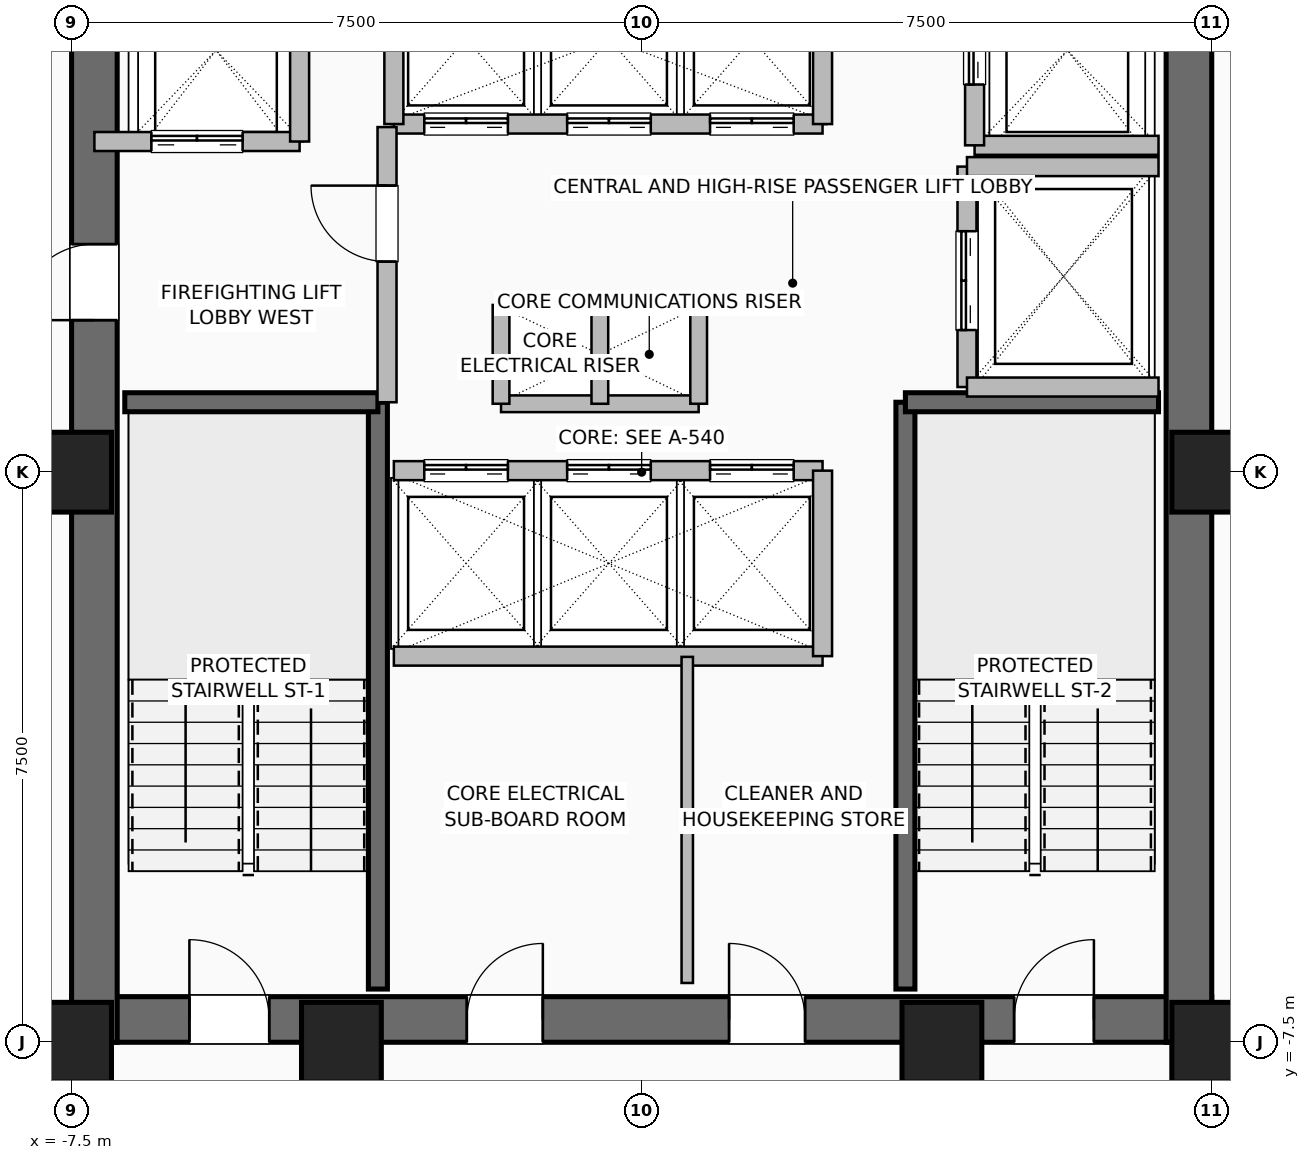
"""IFC4 building model, lengths in metres.
Left out: names, types, materials, properties, quantities, classifications, styles, units other than length and angle.
Written with IfcOpenShell. Run it as: python <this file> out.ifc"""

import sys

from ifc_helpers import new_model, si_unit, direction, frame, frame_2d, origin, origin_2d, place, context, subcontext, project, spatial, rectangle, hollow_rectangle, extrude, element, fill, save


model = new_model("IFC4")
c1 = context("Model", 3, precision=1e-05, world=origin(), true_north=direction((0.0, 1.0)))
c2 = subcontext(c1, "Body", "Model", "MODEL_VIEW")
j1 = project(units=[si_unit("LENGTHUNIT", "METRE"), si_unit("PLANEANGLEUNIT", "RADIAN")], contexts=[c1])
p1 = place(None, origin())
s1 = spatial("IfcSite", under=j1, at=p1, CompositionType="ELEMENT")
p2 = place(p1, origin())
s2 = spatial("IfcBuilding", under=s1, at=p2, CompositionType="ELEMENT")
p3 = place(p2, frame((0.0, 0.0, 151.6)))
s3 = spatial("IfcBuildingStorey", under=s2, at=p3, CompositionType="ELEMENT", Elevation=151.6)
for number, where, z_axis, x_axis in (
    (1, (-7.5, -7.5, 0.0), (0.0, 0.0, 1.0), (1.0, 0.0, 0.0)),
    (2, (-3.95, -7.5, 0.0), (0.0, 0.0, 1.0), (1.0, 0.0, 0.0)),
    (3, (3.95, -7.5, 0.0), (0.0, 0.0, 1.0), (1.0, 0.0, 0.0)),
    (4, (7.5, -7.5, 0.0), (0.0, 0.0, 1.0), (1.0, 0.0, 0.0)),
    (5, (7.5, 0.0, 0.0), (0.0, 0.0, 1.0), (1.0, 0.0, 0.0)),
    (6, (-7.5, 0.0, 0.0), (0.0, 0.0, 1.0), (1.0, 0.0, 0.0)),
):
    element("IfcColumn", number, at=place(p3, frame(where, z_axis=z_axis, x_axis=x_axis)), inside=s3, PredefinedType="COLUMN", context=c2, shape_type="SweptSolid", body=[
        extrude(hollow_rectangle(XDim=1.05, YDim=1.05, WallThickness=0.05, at=origin_2d()), origin(), (0.0, 0.0, 1.0), 3.6),
    ])
p4 = place(p3, frame((-7.5, -7.2, 0.0), z_axis=(0.0, 0.0, 1.0), x_axis=(1.0, 0.0, 0.0)))
e7 = element("IfcWall", 7, at=p4, inside=s3, PredefinedType="SHEAR", context=c2, shape_type="SweptSolid", body=[
    extrude(rectangle(XDim=15.0, YDim=0.6, at=frame_2d((7.5, 0.0))), origin(), (0.0, 0.0, 1.0), 3.25),
])
p5 = place(p4, frame((1.55, 0.0, 0.0)))
e8 = element("IfcOpeningElement", 8, at=p5, cuts=e7, PredefinedType="OPENING", context=c2, shape_type="SweptSolid", body=[
    extrude(rectangle(XDim=1.05, YDim=2.08, at=frame_2d((0.525, 1.04))), frame((0.0, 0.31, 0.0), z_axis=(0.0, -1.0, 0.0), x_axis=(1.0, 0.0, 0.0)), (0.0, 0.0, 1.0), 0.62),
])
p6 = place(p4, frame((12.4, 0.0, 0.0)))
e9 = element("IfcOpeningElement", 9, at=p6, cuts=e7, PredefinedType="OPENING", context=c2, shape_type="SweptSolid", body=[
    extrude(rectangle(XDim=1.05, YDim=2.08, at=frame_2d((0.525, 1.04))), frame((0.0, 0.31, 0.0), z_axis=(0.0, -1.0, 0.0), x_axis=(1.0, 0.0, 0.0)), (0.0, 0.0, 1.0), 0.62),
])
p7 = place(p4, frame((5.2, 0.0, 0.0)))
e10 = element("IfcOpeningElement", 10, at=p7, cuts=e7, PredefinedType="OPENING", context=c2, shape_type="SweptSolid", body=[
    extrude(rectangle(XDim=1.0, YDim=2.08, at=frame_2d((0.5, 1.04))), frame((0.0, 0.31, 0.0), z_axis=(0.0, -1.0, 0.0), x_axis=(1.0, 0.0, 0.0)), (0.0, 0.0, 1.0), 0.62),
])
p8 = place(p4, frame((8.65, 0.0, 0.0)))
e11 = element("IfcOpeningElement", 11, at=p8, cuts=e7, PredefinedType="OPENING", context=c2, shape_type="SweptSolid", body=[
    extrude(rectangle(XDim=1.0, YDim=2.08, at=frame_2d((0.5, 1.04))), frame((0.0, 0.31, 0.0), z_axis=(0.0, -1.0, 0.0), x_axis=(1.0, 0.0, 0.0)), (0.0, 0.0, 1.0), 0.62),
])
p9 = place(p3, frame((-7.2, -7.5, 0.0), z_axis=(0.0, 0.0, 1.0), x_axis=(0.0, 1.0, 0.0)))
e12 = element("IfcWall", 12, at=p9, inside=s3, PredefinedType="SHEAR", context=c2, shape_type="SweptSolid", body=[
    extrude(rectangle(XDim=15.0, YDim=0.6, at=frame_2d((7.5, 0.0))), origin(), (0.0, 0.0, 1.0), 3.25),
])
p10 = place(p9, frame((9.5, 0.0, 0.0)))
e13 = element("IfcOpeningElement", 13, at=p10, cuts=e12, PredefinedType="OPENING", context=c2, shape_type="SweptSolid", body=[
    extrude(rectangle(XDim=1.0, YDim=2.08, at=frame_2d((0.5, 1.04))), frame((0.0, 0.31, 0.0), z_axis=(0.0, -1.0, 0.0), x_axis=(1.0, 0.0, 0.0)), (0.0, 0.0, 1.0), 0.62),
])
p11 = place(p3, frame((7.2, -7.5, 0.0), z_axis=(0.0, 0.0, 1.0), x_axis=(0.0, 1.0, 0.0)))
e14 = element("IfcWall", 14, at=p11, inside=s3, PredefinedType="SHEAR", context=c2, shape_type="SweptSolid", body=[
    extrude(rectangle(XDim=15.0, YDim=0.6, at=frame_2d((7.5, 0.0))), origin(), (0.0, 0.0, 1.0), 3.25),
])
p12 = place(p3, frame((-3.47, -6.8, 0.0), z_axis=(0.0, 0.0, 1.0), x_axis=(0.0, 1.0, 0.0)))
e15 = element("IfcWall", 15, at=p12, inside=s3, PredefinedType="SHEAR", context=c2, shape_type="SweptSolid", body=[
    extrude(rectangle(XDim=7.72, YDim=0.25, at=frame_2d((3.86, 0.0))), origin(), (0.0, 0.0, 1.0), 3.25),
])
p13 = place(p3, frame((-6.8, 0.92, 0.0), z_axis=(0.0, 0.0, 1.0), x_axis=(1.0, 0.0, 0.0)))
e16 = element("IfcWall", 16, at=p13, inside=s3, PredefinedType="SHEAR", context=c2, shape_type="SweptSolid", body=[
    extrude(rectangle(XDim=3.33, YDim=0.25, at=frame_2d((1.665, 0.0))), origin(), (0.0, 0.0, 1.0), 3.25),
])
p14 = place(p3, frame((3.47, -6.8, 0.0), z_axis=(0.0, 0.0, 1.0), x_axis=(0.0, 1.0, 0.0)))
e17 = element("IfcWall", 17, at=p14, inside=s3, PredefinedType="SHEAR", context=c2, shape_type="SweptSolid", body=[
    extrude(rectangle(XDim=7.72, YDim=0.25, at=frame_2d((3.86, 0.0))), origin(), (0.0, 0.0, 1.0), 3.25),
])
p15 = place(p3, frame((3.47, 0.92, 0.0), z_axis=(0.0, 0.0, 1.0), x_axis=(1.0, 0.0, 0.0)))
e18 = element("IfcWall", 18, at=p15, inside=s3, PredefinedType="SHEAR", context=c2, shape_type="SweptSolid", body=[
    extrude(rectangle(XDim=3.33, YDim=0.25, at=frame_2d((1.665, 0.0))), origin(), (0.0, 0.0, 1.0), 3.25),
])
for number, where, z_axis, x_axis in (
    (19, (-1.85, 2.2, 0.0), (0.0, 0.0, 1.0), (1.0, 0.0, 0.0)),
    (20, (-1.85, 0.9, 0.0), (0.0, 0.0, 1.0), (1.0, 0.0, 0.0)),
):
    element("IfcWall", number, at=place(p3, frame(where, z_axis=z_axis, x_axis=x_axis)), inside=s3, PredefinedType="PARTITIONING", context=c2, shape_type="SweptSolid", body=[
        extrude(rectangle(XDim=2.6, YDim=0.22, at=frame_2d((1.3, 0.0))), origin(), (0.0, 0.0, 1.0), 3.25),
    ])
for number, where, z_axis, x_axis in (
    (21, (-0.55, 0.9, 0.0), (0.0, 0.0, 1.0), (0.0, 1.0, 0.0)),
    (22, (0.75, 0.9, 0.0), (0.0, 0.0, 1.0), (0.0, 1.0, 0.0)),
    (23, (-1.85, 0.9, 0.0), (0.0, 0.0, 1.0), (0.0, 1.0, 0.0)),
):
    element("IfcWall", number, at=place(p3, frame(where, z_axis=z_axis, x_axis=x_axis)), inside=s3, PredefinedType="PARTITIONING", context=c2, shape_type="SweptSolid", body=[
        extrude(rectangle(XDim=1.3, YDim=0.22, at=frame_2d((0.65, 0.0))), origin(), (0.0, 0.0, 1.0), 3.25),
    ])
p16 = place(p3, frame((-3.26, 0.02, 0.0), z_axis=(0.0, 0.0, 1.0), x_axis=(1.0, 0.0, 0.0)))
e24 = element("IfcWall", 24, at=p16, inside=s3, PredefinedType="SHEAR", context=c2, shape_type="SweptSolid", body=[
    extrude(rectangle(XDim=5.64, YDim=0.25, at=frame_2d((2.82, 0.0))), origin(), (0.0, 0.0, 1.0), 3.25),
])
p17 = place(p16, frame((0.4, 0.0, 0.0)))
e25 = element("IfcOpeningElement", 25, at=p17, cuts=e24, PredefinedType="OPENING", context=c2, shape_type="SweptSolid", body=[
    extrude(rectangle(XDim=1.1, YDim=2.2, at=frame_2d((0.55, 1.1))), frame((0.0, 0.135, 0.0), z_axis=(0.0, -1.0, 0.0), x_axis=(1.0, 0.0, 0.0)), (0.0, 0.0, 1.0), 0.27),
])
p18 = place(p16, frame((2.28, 0.0, 0.0)))
e26 = element("IfcOpeningElement", 26, at=p18, cuts=e24, PredefinedType="OPENING", context=c2, shape_type="SweptSolid", body=[
    extrude(rectangle(XDim=1.1, YDim=2.2, at=frame_2d((0.55, 1.1))), frame((0.0, 0.135, 0.0), z_axis=(0.0, -1.0, 0.0), x_axis=(1.0, 0.0, 0.0)), (0.0, 0.0, 1.0), 0.27),
])
p19 = place(p16, frame((4.16, 0.0, 0.0)))
e27 = element("IfcOpeningElement", 27, at=p19, cuts=e24, PredefinedType="OPENING", context=c2, shape_type="SweptSolid", body=[
    extrude(rectangle(XDim=1.1, YDim=2.2, at=frame_2d((0.55, 1.1))), frame((0.0, 0.135, 0.0), z_axis=(0.0, -1.0, 0.0), x_axis=(1.0, 0.0, 0.0)), (0.0, 0.0, 1.0), 0.27),
])
p20 = place(p3, frame((-3.26, -2.42, 0.0), z_axis=(0.0, 0.0, 1.0), x_axis=(1.0, 0.0, 0.0)))
e28 = element("IfcWall", 28, at=p20, inside=s3, PredefinedType="SHEAR", context=c2, shape_type="SweptSolid", body=[
    extrude(rectangle(XDim=5.64, YDim=0.25, at=frame_2d((2.82, 0.0))), origin(), (0.0, 0.0, 1.0), 3.25),
])
p21 = place(p3, frame((2.38, -2.42, 0.0), z_axis=(0.0, 0.0, 1.0), x_axis=(0.0, 1.0, 0.0)))
e29 = element("IfcWall", 29, at=p21, inside=s3, PredefinedType="SHEAR", context=c2, shape_type="SweptSolid", body=[
    extrude(rectangle(XDim=2.44, YDim=0.25, at=frame_2d((1.22, 0.0))), origin(), (0.0, 0.0, 1.0), 3.25),
])
p22 = place(p3, frame((-3.26, 4.58, 0.0), z_axis=(0.0, 0.0, 1.0), x_axis=(1.0, 0.0, 0.0)))
e30 = element("IfcWall", 30, at=p22, inside=s3, PredefinedType="SHEAR", context=c2, shape_type="SweptSolid", body=[
    extrude(rectangle(XDim=5.64, YDim=0.25, at=frame_2d((2.82, 0.0))), origin(), (0.0, 0.0, 1.0), 3.25),
])
p23 = place(p22, frame((0.4, 0.0, 0.0)))
e31 = element("IfcOpeningElement", 31, at=p23, cuts=e30, PredefinedType="OPENING", context=c2, shape_type="SweptSolid", body=[
    extrude(rectangle(XDim=1.1, YDim=2.2, at=frame_2d((0.55, 1.1))), frame((0.0, 0.135, 0.0), z_axis=(0.0, -1.0, 0.0), x_axis=(1.0, 0.0, 0.0)), (0.0, 0.0, 1.0), 0.27),
])
p24 = place(p22, frame((2.28, 0.0, 0.0)))
e32 = element("IfcOpeningElement", 32, at=p24, cuts=e30, PredefinedType="OPENING", context=c2, shape_type="SweptSolid", body=[
    extrude(rectangle(XDim=1.1, YDim=2.2, at=frame_2d((0.55, 1.1))), frame((0.0, 0.135, 0.0), z_axis=(0.0, -1.0, 0.0), x_axis=(1.0, 0.0, 0.0)), (0.0, 0.0, 1.0), 0.27),
])
p25 = place(p22, frame((4.16, 0.0, 0.0)))
e33 = element("IfcOpeningElement", 33, at=p25, cuts=e30, PredefinedType="OPENING", context=c2, shape_type="SweptSolid", body=[
    extrude(rectangle(XDim=1.1, YDim=2.2, at=frame_2d((0.55, 1.1))), frame((0.0, 0.135, 0.0), z_axis=(0.0, -1.0, 0.0), x_axis=(1.0, 0.0, 0.0)), (0.0, 0.0, 1.0), 0.27),
])
for number, where, z_axis, x_axis in (
    (34, (-3.26, 4.58, 0.0), (0.0, 0.0, 1.0), (0.0, 1.0, 0.0)),
    (35, (2.38, 4.58, 0.0), (0.0, 0.0, 1.0), (0.0, 1.0, 0.0)),
):
    element("IfcWall", number, at=place(p3, frame(where, z_axis=z_axis, x_axis=x_axis)), inside=s3, PredefinedType="SHEAR", context=c2, shape_type="SweptSolid", body=[
        extrude(rectangle(XDim=2.22, YDim=0.25, at=frame_2d((1.11, 0.0))), origin(), (0.0, 0.0, 1.0), 3.25),
    ])
p26 = place(p3, frame((-7.2, 4.35, 0.0), z_axis=(0.0, 0.0, 1.0), x_axis=(1.0, 0.0, 0.0)))
e36 = element("IfcWall", 36, at=p26, inside=s3, PredefinedType="SHEAR", context=c2, shape_type="SweptSolid", body=[
    extrude(rectangle(XDim=2.7, YDim=0.25, at=frame_2d((1.35, 0.0))), origin(), (0.0, 0.0, 1.0), 3.25),
])
p27 = place(p26, frame((0.75, 0.0, 0.0)))
e37 = element("IfcOpeningElement", 37, at=p27, cuts=e36, PredefinedType="OPENING", context=c2, shape_type="SweptSolid", body=[
    extrude(rectangle(XDim=1.2, YDim=2.2, at=frame_2d((0.6, 1.1))), frame((0.0, 0.135, 0.0), z_axis=(0.0, -1.0, 0.0), x_axis=(1.0, 0.0, 0.0)), (0.0, 0.0, 1.0), 0.27),
])
p28 = place(p3, frame((-4.5, 4.35, 0.0), z_axis=(0.0, 0.0, 1.0), x_axis=(0.0, 1.0, 0.0)))
e38 = element("IfcWall", 38, at=p28, inside=s3, PredefinedType="SHEAR", context=c2, shape_type="SweptSolid", body=[
    extrude(rectangle(XDim=2.85, YDim=0.25, at=frame_2d((1.425, 0.0))), origin(), (0.0, 0.0, 1.0), 3.25),
])
p29 = place(p3, frame((4.38, 4.3, 0.0), z_axis=(0.0, 0.0, 1.0), x_axis=(1.0, 0.0, 0.0)))
e39 = element("IfcWall", 39, at=p29, inside=s3, PredefinedType="SHEAR", context=c2, shape_type="SweptSolid", body=[
    extrude(rectangle(XDim=2.42, YDim=0.25, at=frame_2d((1.21, 0.0))), origin(), (0.0, 0.0, 1.0), 3.25),
])
p30 = place(p3, frame((4.38, 4.3, 0.0), z_axis=(0.0, 0.0, 1.0), x_axis=(0.0, 1.0, 0.0)))
e40 = element("IfcWall", 40, at=p30, inside=s3, PredefinedType="SHEAR", context=c2, shape_type="SweptSolid", body=[
    extrude(rectangle(XDim=2.5, YDim=0.25, at=frame_2d((1.25, 0.0))), origin(), (0.0, 0.0, 1.0), 3.25),
])
p31 = place(p30, frame((0.8, 0.0, 0.0)))
e41 = element("IfcOpeningElement", 41, at=p31, cuts=e40, PredefinedType="OPENING", context=c2, shape_type="SweptSolid", body=[
    extrude(rectangle(XDim=1.2, YDim=2.2, at=frame_2d((0.6, 1.1))), frame((0.0, 0.135, 0.0), z_axis=(0.0, -1.0, 0.0), x_axis=(1.0, 0.0, 0.0)), (0.0, 0.0, 1.0), 0.27),
])
p32 = place(p3, frame((4.28, 1.12, 0.0), z_axis=(0.0, 0.0, 1.0), x_axis=(0.0, 1.0, 0.0)))
e42 = element("IfcWall", 42, at=p32, inside=s3, PredefinedType="SHEAR", context=c2, shape_type="SweptSolid", body=[
    extrude(rectangle(XDim=2.9, YDim=0.25, at=frame_2d((1.45, 0.0))), origin(), (0.0, 0.0, 1.0), 3.25),
])
p33 = place(p32, frame((0.75, 0.0, 0.0)))
e43 = element("IfcOpeningElement", 43, at=p33, cuts=e42, PredefinedType="OPENING", context=c2, shape_type="SweptSolid", body=[
    extrude(rectangle(XDim=1.3, YDim=2.3, at=frame_2d((0.65, 1.15))), frame((0.0, 0.135, 0.0), z_axis=(0.0, -1.0, 0.0), x_axis=(1.0, 0.0, 0.0)), (0.0, 0.0, 1.0), 0.27),
])
for number, where, z_axis, x_axis in (
    (44, (4.28, 1.12, 0.0), (0.0, 0.0, 1.0), (1.0, 0.0, 0.0)),
    (45, (4.28, 4.02, 0.0), (0.0, 0.0, 1.0), (1.0, 0.0, 0.0)),
):
    element("IfcWall", number, at=place(p3, frame(where, z_axis=z_axis, x_axis=x_axis)), inside=s3, PredefinedType="SHEAR", context=c2, shape_type="SweptSolid", body=[
        extrude(rectangle(XDim=2.52, YDim=0.25, at=frame_2d((1.26, 0.0))), origin(), (0.0, 0.0, 1.0), 3.25),
    ])
p34 = place(p3, frame((-3.35, 0.92, 0.0), z_axis=(0.0, 0.0, 1.0), x_axis=(0.0, 1.0, 0.0)))
e46 = element("IfcWall", 46, at=p34, inside=s3, PredefinedType="SHEAR", context=c2, shape_type="SweptSolid", body=[
    extrude(rectangle(XDim=3.62, YDim=0.25, at=frame_2d((1.81, 0.0))), origin(), (0.0, 0.0, 1.0), 3.25),
])
p35 = place(p34, frame((1.85, 0.0, 0.0)))
e47 = element("IfcOpeningElement", 47, at=p35, cuts=e46, PredefinedType="OPENING", context=c2, shape_type="SweptSolid", body=[
    extrude(rectangle(XDim=1.0, YDim=2.08, at=frame_2d((0.5, 1.04))), frame((0.0, 0.135, 0.0), z_axis=(0.0, -1.0, 0.0), x_axis=(1.0, 0.0, 0.0)), (0.0, 0.0, 1.0), 0.27),
])
p36 = place(p3, frame((0.6, -6.72, 0.0), z_axis=(0.0, 0.0, 1.0), x_axis=(0.0, 1.0, 0.0)))
e48 = element("IfcWall", 48, at=p36, inside=s3, PredefinedType="PARTITIONING", context=c2, shape_type="SweptSolid", body=[
    extrude(rectangle(XDim=4.29, YDim=0.15, at=frame_2d((2.145, 0.0))), origin(), (0.0, 0.0, 1.0), 3.25),
])
p37 = place(p3, frame((7.45, -7.48, 0.0), z_axis=(0.0, 0.0, 1.0), x_axis=(1.0, 0.0, 0.0)))
e49 = element("IfcWall", 49, at=p37, inside=s3, PredefinedType="PARTITIONING", context=c2, shape_type="SweptSolid", body=[
    extrude(rectangle(XDim=0.95, YDim=0.15, at=frame_2d((0.475, 0.0))), origin(), (0.0, 0.0, 1.0), 3.25),
])
p38 = place(p5, origin())
e50 = element("IfcDoor", 50, at=p38, inside=s3, OperationType="SINGLE_SWING_LEFT", PredefinedType="DOOR", context=c2, shape_type="SweptSolid", body=[
    extrude(rectangle(XDim=1.05, YDim=2.08, at=frame_2d((0.525, 1.04))), frame((0.0, 0.025, 0.0), z_axis=(0.0, -1.0, 0.0), x_axis=(1.0, 0.0, 0.0)), (0.0, 0.0, 1.0), 0.05),
])
fill(e8, e50)
p39 = place(p6, origin())
e51 = element("IfcDoor", 51, at=p39, inside=s3, OperationType="SINGLE_SWING_RIGHT", PredefinedType="DOOR", context=c2, shape_type="SweptSolid", body=[
    extrude(rectangle(XDim=1.05, YDim=2.08, at=frame_2d((0.525, 1.04))), frame((0.0, 0.025, 0.0), z_axis=(0.0, -1.0, 0.0), x_axis=(1.0, 0.0, 0.0)), (0.0, 0.0, 1.0), 0.05),
])
fill(e9, e51)
p40 = place(p10, origin())
e52 = element("IfcDoor", 52, at=p40, inside=s3, OperationType="SINGLE_SWING_LEFT", PredefinedType="DOOR", context=c2, shape_type="SweptSolid", body=[
    extrude(rectangle(XDim=1.0, YDim=2.08, at=frame_2d((0.5, 1.04))), frame((0.0, 0.025, 0.0), z_axis=(0.0, -1.0, 0.0), x_axis=(1.0, 0.0, 0.0)), (0.0, 0.0, 1.0), 0.05),
])
fill(e13, e52)
p41 = place(p7, origin())
e53 = element("IfcDoor", 53, at=p41, inside=s3, OperationType="SINGLE_SWING_RIGHT", PredefinedType="DOOR", context=c2, shape_type="SweptSolid", body=[
    extrude(rectangle(XDim=1.0, YDim=2.08, at=frame_2d((0.5, 1.04))), frame((0.0, 0.025, 0.0), z_axis=(0.0, -1.0, 0.0), x_axis=(1.0, 0.0, 0.0)), (0.0, 0.0, 1.0), 0.05),
])
fill(e10, e53)
p42 = place(p8, origin())
e54 = element("IfcDoor", 54, at=p42, inside=s3, OperationType="SINGLE_SWING_LEFT", PredefinedType="DOOR", context=c2, shape_type="SweptSolid", body=[
    extrude(rectangle(XDim=1.0, YDim=2.08, at=frame_2d((0.5, 1.04))), frame((0.0, 0.025, 0.0), z_axis=(0.0, -1.0, 0.0), x_axis=(1.0, 0.0, 0.0)), (0.0, 0.0, 1.0), 0.05),
])
fill(e11, e54)
p43 = place(p17, origin())
e55 = element("IfcDoor", 55, at=p43, inside=s3, OperationType="DOUBLE_DOOR_SLIDING", PredefinedType="DOOR", context=c2, shape_type="SweptSolid", body=[
    extrude(rectangle(XDim=1.1, YDim=2.2, at=frame_2d((0.55, 1.1))), frame((0.0, 0.025, 0.0), z_axis=(0.0, -1.0, 0.0), x_axis=(1.0, 0.0, 0.0)), (0.0, 0.0, 1.0), 0.05),
])
fill(e25, e55)
p44 = place(p18, origin())
e56 = element("IfcDoor", 56, at=p44, inside=s3, OperationType="DOUBLE_DOOR_SLIDING", PredefinedType="DOOR", context=c2, shape_type="SweptSolid", body=[
    extrude(rectangle(XDim=1.1, YDim=2.2, at=frame_2d((0.55, 1.1))), frame((0.0, 0.025, 0.0), z_axis=(0.0, -1.0, 0.0), x_axis=(1.0, 0.0, 0.0)), (0.0, 0.0, 1.0), 0.05),
])
fill(e26, e56)
p45 = place(p19, origin())
e57 = element("IfcDoor", 57, at=p45, inside=s3, OperationType="DOUBLE_DOOR_SLIDING", PredefinedType="DOOR", context=c2, shape_type="SweptSolid", body=[
    extrude(rectangle(XDim=1.1, YDim=2.2, at=frame_2d((0.55, 1.1))), frame((0.0, 0.025, 0.0), z_axis=(0.0, -1.0, 0.0), x_axis=(1.0, 0.0, 0.0)), (0.0, 0.0, 1.0), 0.05),
])
fill(e27, e57)
p46 = place(p23, origin())
e58 = element("IfcDoor", 58, at=p46, inside=s3, OperationType="DOUBLE_DOOR_SLIDING", PredefinedType="DOOR", context=c2, shape_type="SweptSolid", body=[
    extrude(rectangle(XDim=1.1, YDim=2.2, at=frame_2d((0.55, 1.1))), frame((0.0, 0.025, 0.0), z_axis=(0.0, -1.0, 0.0), x_axis=(1.0, 0.0, 0.0)), (0.0, 0.0, 1.0), 0.05),
])
fill(e31, e58)
p47 = place(p24, origin())
e59 = element("IfcDoor", 59, at=p47, inside=s3, OperationType="DOUBLE_DOOR_SLIDING", PredefinedType="DOOR", context=c2, shape_type="SweptSolid", body=[
    extrude(rectangle(XDim=1.1, YDim=2.2, at=frame_2d((0.55, 1.1))), frame((0.0, 0.025, 0.0), z_axis=(0.0, -1.0, 0.0), x_axis=(1.0, 0.0, 0.0)), (0.0, 0.0, 1.0), 0.05),
])
fill(e32, e59)
p48 = place(p25, origin())
e60 = element("IfcDoor", 60, at=p48, inside=s3, OperationType="DOUBLE_DOOR_SLIDING", PredefinedType="DOOR", context=c2, shape_type="SweptSolid", body=[
    extrude(rectangle(XDim=1.1, YDim=2.2, at=frame_2d((0.55, 1.1))), frame((0.0, 0.025, 0.0), z_axis=(0.0, -1.0, 0.0), x_axis=(1.0, 0.0, 0.0)), (0.0, 0.0, 1.0), 0.05),
])
fill(e33, e60)
p49 = place(p27, origin())
e61 = element("IfcDoor", 61, at=p49, inside=s3, OperationType="DOUBLE_DOOR_SLIDING", PredefinedType="DOOR", context=c2, shape_type="SweptSolid", body=[
    extrude(rectangle(XDim=1.2, YDim=2.2, at=frame_2d((0.6, 1.1))), frame((0.0, 0.025, 0.0), z_axis=(0.0, -1.0, 0.0), x_axis=(1.0, 0.0, 0.0)), (0.0, 0.0, 1.0), 0.05),
])
fill(e37, e61)
p50 = place(p31, origin())
e62 = element("IfcDoor", 62, at=p50, inside=s3, OperationType="DOUBLE_DOOR_SLIDING", PredefinedType="DOOR", context=c2, shape_type="SweptSolid", body=[
    extrude(rectangle(XDim=1.2, YDim=2.2, at=frame_2d((0.6, 1.1))), frame((0.0, 0.025, 0.0), z_axis=(0.0, -1.0, 0.0), x_axis=(1.0, 0.0, 0.0)), (0.0, 0.0, 1.0), 0.05),
])
fill(e41, e62)
p51 = place(p33, origin())
e63 = element("IfcDoor", 63, at=p51, inside=s3, OperationType="DOUBLE_DOOR_SLIDING", PredefinedType="DOOR", context=c2, shape_type="SweptSolid", body=[
    extrude(rectangle(XDim=1.3, YDim=2.3, at=frame_2d((0.65, 1.15))), frame((0.0, 0.025, 0.0), z_axis=(0.0, -1.0, 0.0), x_axis=(1.0, 0.0, 0.0)), (0.0, 0.0, 1.0), 0.05),
])
fill(e43, e63)
p52 = place(p35, origin())
e64 = element("IfcDoor", 64, at=p52, inside=s3, OperationType="SINGLE_SWING_RIGHT", PredefinedType="DOOR", context=c2, shape_type="SweptSolid", body=[
    extrude(rectangle(XDim=1.0, YDim=2.08, at=frame_2d((0.5, 1.04))), frame((0.0, 0.025, 0.0), z_axis=(0.0, -1.0, 0.0), x_axis=(1.0, 0.0, 0.0)), (0.0, 0.0, 1.0), 0.05),
])
fill(e47, e64)
save(model, sys.argv[1])
